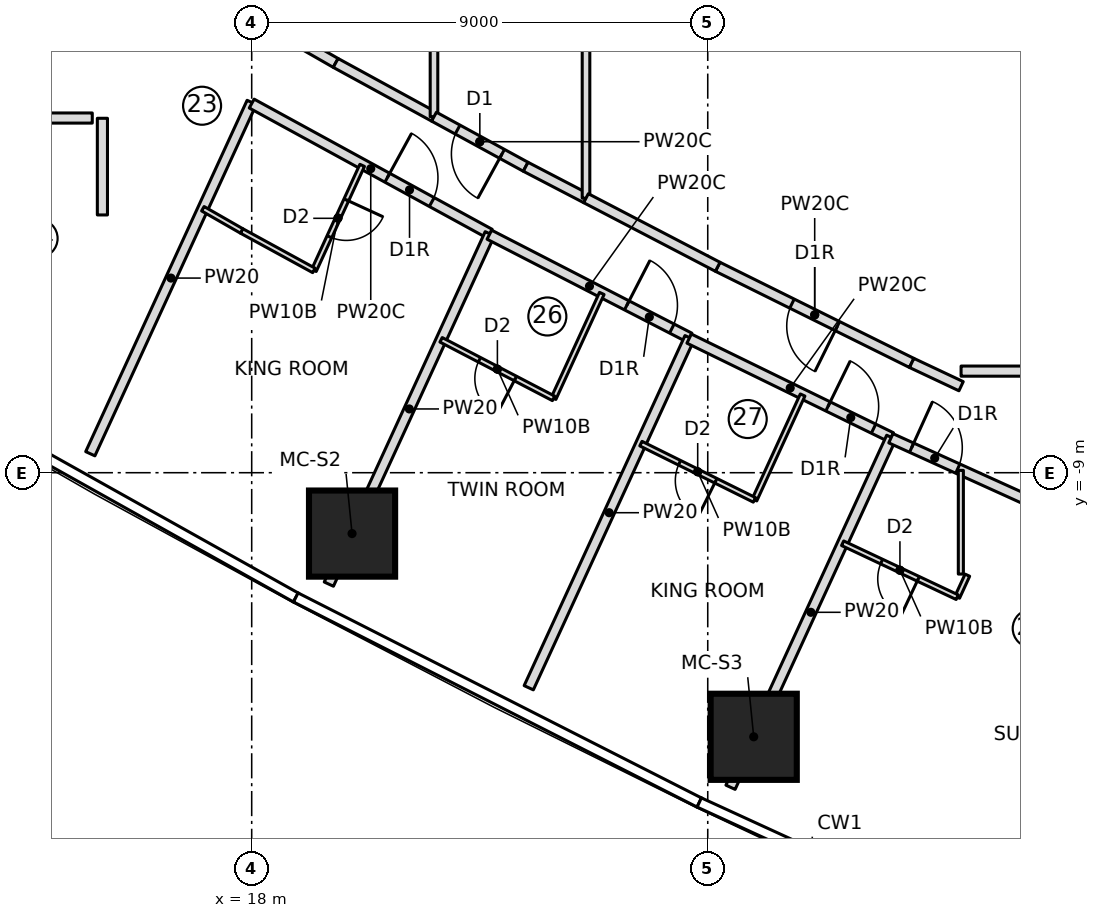
"""IFC4 building model, lengths in metres.
Left out: names, types, materials, properties, quantities, classifications, styles, units other than length and angle.
Written with IfcOpenShell. Run it as: python <this file> out.ifc"""

import sys

from ifc_helpers import new_model, si_unit, direction, frame, frame_2d, origin, origin_2d, place, context, subcontext, project, spatial, rectangle, extrude, element, fill, save


model = new_model("IFC4")
c1 = context("Model", 3, precision=1e-05, world=origin(), true_north=direction((0.0, 1.0)))
c2 = subcontext(c1, "Body", "Model", "MODEL_VIEW")
j1 = project(units=[si_unit("LENGTHUNIT", "METRE"), si_unit("PLANEANGLEUNIT", "RADIAN")], contexts=[c1])
p1 = place(None, origin())
s1 = spatial("IfcSite", under=j1, at=p1, CompositionType="ELEMENT")
p2 = place(p1, origin())
s2 = spatial("IfcBuilding", under=s1, at=p2, CompositionType="ELEMENT")
p3 = place(p2, frame((0.0, 0.0, 99.1)))
s3 = spatial("IfcBuildingStorey", under=s2, at=p3, CompositionType="ELEMENT", Elevation=99.1)
for number, where, z_axis, x_axis in (
    (1, (19.981, -10.202, 0.0), (0.0, 0.0, 1.0), (1.0, 0.0, 0.0)),
    (2, (27.907, -14.212, 0.0), (0.0, 0.0, 1.0), (1.0, 0.0, 0.0)),
):
    element("IfcColumn", number, at=place(p3, frame(where, z_axis=z_axis, x_axis=x_axis)), inside=s3, PredefinedType="COLUMN", context=c2, shape_type="SweptSolid", body=[
        extrude(rectangle(XDim=1.7, YDim=1.7, at=origin_2d()), origin(), (0.0, 0.0, 1.0), 3.55),
    ])
p4 = place(p3, frame((11.685, -2.0, 0.0), z_axis=(0.0, 0.0, 1.0), x_axis=(1.0, 0.0, 0.0)))
e3 = element("IfcWall", 3, at=p4, inside=s3, PredefinedType="PARTITIONING", context=c2, shape_type="SweptSolid", body=[
    extrude(rectangle(XDim=3.168, YDim=0.2, at=frame_2d((1.584, 0.0))), origin(), (0.0, 0.0, 1.0), 3.25),
])
p5 = place(p4, frame((1.084, 0.0, 0.0)))
e4 = element("IfcOpeningElement", 4, at=p5, cuts=e3, PredefinedType="OPENING", context=c2, shape_type="SweptSolid", body=[
    extrude(rectangle(XDim=1.0, YDim=2.1, at=frame_2d((0.5, 1.05))), frame((0.0, 0.11, 0.0), z_axis=(0.0, -1.0, 0.0), x_axis=(1.0, 0.0, 0.0)), (0.0, 0.0, 1.0), 0.22),
])
p6 = place(p3, frame((14.815, -8.626, 0.0), z_axis=(0.0, 0.0, 1.0), x_axis=(0.417432341259, 0.908708006166, 0.0)))
e5 = element("IfcWall", 5, at=p6, inside=s3, PredefinedType="PARTITIONING", context=c2, shape_type="SweptSolid", body=[
    extrude(rectangle(XDim=7.631, YDim=0.2, at=frame_2d((3.815, 0.0))), origin(), (0.0, 0.0, 1.0), 3.25),
])
p7 = place(p3, frame((18.0, -1.715, 0.0), z_axis=(0.0, 0.0, 1.0), x_axis=(0.877354946945, -0.479841950096, 0.0)))
e6 = element("IfcWall", 6, at=p7, inside=s3, PredefinedType="PARTITIONING", context=c2, shape_type="SweptSolid", body=[
    extrude(rectangle(XDim=5.355, YDim=0.2, at=frame_2d((2.678, 0.0))), origin(), (0.0, 0.0, 1.0), 3.25),
])
p8 = place(p7, frame((3.05, 0.0, 0.0)))
e7 = element("IfcOpeningElement", 7, at=p8, cuts=e6, PredefinedType="OPENING", context=c2, shape_type="SweptSolid", body=[
    extrude(rectangle(XDim=1.0, YDim=2.1, at=frame_2d((0.5, 1.05))), frame((0.0, 0.11, 0.0), z_axis=(0.0, -1.0, 0.0), x_axis=(1.0, 0.0, 0.0)), (0.0, 0.0, 1.0), 0.22),
])
p9 = place(p3, frame((20.18, -2.934, 0.0), z_axis=(0.0, 0.0, 1.0), x_axis=(-0.417450047292, -0.908699872354, 0.0)))
e8 = element("IfcWall", 8, at=p9, inside=s3, PredefinedType="PARTITIONING", context=c2, shape_type="SweptSolid", body=[
    extrude(rectangle(XDim=2.283, YDim=0.1, at=frame_2d((1.141, 0.0))), origin(), (0.0, 0.0, 1.0), 3.25),
])
p10 = place(p9, frame((0.75, 0.0, 0.0)))
e9 = element("IfcOpeningElement", 9, at=p10, cuts=e8, PredefinedType="OPENING", context=c2, shape_type="SweptSolid", body=[
    extrude(rectangle(XDim=0.8, YDim=2.1, at=frame_2d((0.4, 1.05))), frame((0.0, 0.06, 0.0), z_axis=(0.0, -1.0, 0.0), x_axis=(1.0, 0.0, 0.0)), (0.0, 0.0, 1.0), 0.12),
])
p11 = place(p3, frame((19.228, -5.008, 0.0), z_axis=(0.0, 0.0, 1.0), x_axis=(-0.877424481957, 0.479714788663, 0.0)))
e10 = element("IfcWall", 10, at=p11, inside=s3, PredefinedType="PARTITIONING", context=c2, shape_type="SweptSolid", body=[
    extrude(rectangle(XDim=1.625, YDim=0.1, at=frame_2d((0.813, 0.0))), origin(), (0.0, 0.0, 1.0), 3.25),
])
p12 = place(p3, frame((17.801, -4.229, 0.0), z_axis=(0.0, 0.0, 1.0), x_axis=(-0.867629162742, 0.497211862248, 0.0)))
e11 = element("IfcWall", 11, at=p12, inside=s3, PredefinedType="PARTITIONING", context=c2, shape_type="SweptSolid", body=[
    extrude(rectangle(XDim=0.882, YDim=0.1, at=frame_2d((0.441, 0.0))), origin(), (0.0, 0.0, 1.0), 3.25),
])
p13 = place(p3, frame((19.522, -11.199, 0.0), z_axis=(0.0, 0.0, 1.0), x_axis=(0.417413534969, 0.908716644959, 0.0)))
e12 = element("IfcWall", 12, at=p13, inside=s3, PredefinedType="PARTITIONING", context=c2, shape_type="SweptSolid", body=[
    extrude(rectangle(XDim=7.609, YDim=0.2, at=frame_2d((3.805, 0.0))), origin(), (0.0, 0.0, 1.0), 3.25),
])
p14 = place(p3, frame((22.69, -4.302, 0.0), z_axis=(0.0, 0.0, 1.0), x_axis=(0.889236075961, -0.457448577667, 0.0)))
e13 = element("IfcWall", 13, at=p14, inside=s3, PredefinedType="PARTITIONING", context=c2, shape_type="SweptSolid", body=[
    extrude(rectangle(XDim=4.443, YDim=0.2, at=frame_2d((2.222, 0.0))), origin(), (0.0, 0.0, 1.0), 3.25),
])
p15 = place(p14, frame((3.05, 0.0, 0.0)))
e14 = element("IfcOpeningElement", 14, at=p15, cuts=e13, PredefinedType="OPENING", context=c2, shape_type="SweptSolid", body=[
    extrude(rectangle(XDim=1.0, YDim=2.1, at=frame_2d((0.5, 1.05))), frame((0.0, 0.11, 0.0), z_axis=(0.0, -1.0, 0.0), x_axis=(1.0, 0.0, 0.0)), (0.0, 0.0, 1.0), 0.22),
])
p16 = place(p3, frame((24.909, -5.462, 0.0), z_axis=(0.0, 0.0, 1.0), x_axis=(-0.417454762401, -0.908697706253, 0.0)))
e15 = element("IfcWall", 15, at=p16, inside=s3, PredefinedType="PARTITIONING", context=c2, shape_type="SweptSolid", body=[
    extrude(rectangle(XDim=2.28, YDim=0.1, at=frame_2d((1.14, 0.0))), origin(), (0.0, 0.0, 1.0), 3.25),
])
p17 = place(p3, frame((23.958, -7.533, 0.0), z_axis=(0.0, 0.0, 1.0), x_axis=(-0.886911586599, 0.461939214135, 0.0)))
e16 = element("IfcWall", 16, at=p17, inside=s3, PredefinedType="PARTITIONING", context=c2, shape_type="SweptSolid", body=[
    extrude(rectangle(XDim=2.503, YDim=0.1, at=frame_2d((1.251, 0.0))), origin(), (0.0, 0.0, 1.0), 3.25),
])
p18 = place(p17, frame((0.85, 0.0, 0.0)))
e17 = element("IfcOpeningElement", 17, at=p18, cuts=e16, PredefinedType="OPENING", context=c2, shape_type="SweptSolid", body=[
    extrude(rectangle(XDim=0.8, YDim=2.1, at=frame_2d((0.4, 1.05))), frame((0.0, 0.06, 0.0), z_axis=(0.0, -1.0, 0.0), x_axis=(1.0, 0.0, 0.0)), (0.0, 0.0, 1.0), 0.12),
])
p19 = place(p3, frame((23.467, -13.244, 0.0), z_axis=(0.0, 0.0, 1.0), x_axis=(0.417455028008, 0.908697584233, 0.0)))
e18 = element("IfcWall", 18, at=p19, inside=s3, PredefinedType="PARTITIONING", context=c2, shape_type="SweptSolid", body=[
    extrude(rectangle(XDim=7.603, YDim=0.2, at=frame_2d((3.802, 0.0))), origin(), (0.0, 0.0, 1.0), 3.25),
])
p20 = place(p3, frame((26.633, -6.353, 0.0), z_axis=(0.0, 0.0, 1.0), x_axis=(0.898502457097, -0.438968489291, 0.0)))
e19 = element("IfcWall", 19, at=p20, inside=s3, PredefinedType="PARTITIONING", context=c2, shape_type="SweptSolid", body=[
    extrude(rectangle(XDim=4.44, YDim=0.2, at=frame_2d((2.22, 0.0))), origin(), (0.0, 0.0, 1.0), 3.25),
])
p21 = place(p20, frame((3.05, 0.0, 0.0)))
e20 = element("IfcOpeningElement", 20, at=p21, cuts=e19, PredefinedType="OPENING", context=c2, shape_type="SweptSolid", body=[
    extrude(rectangle(XDim=1.0, YDim=2.1, at=frame_2d((0.5, 1.05))), frame((0.0, 0.11, 0.0), z_axis=(0.0, -1.0, 0.0), x_axis=(1.0, 0.0, 0.0)), (0.0, 0.0, 1.0), 0.22),
])
p22 = place(p3, frame((28.873, -7.467, 0.0), z_axis=(0.0, 0.0, 1.0), x_axis=(-0.417433204355, -0.908707609686, 0.0)))
e21 = element("IfcWall", 21, at=p22, inside=s3, PredefinedType="PARTITIONING", context=c2, shape_type="SweptSolid", body=[
    extrude(rectangle(XDim=2.278, YDim=0.1, at=frame_2d((1.139, 0.0))), origin(), (0.0, 0.0, 1.0), 3.25),
])
p23 = place(p3, frame((27.922, -9.537, 0.0), z_axis=(0.0, 0.0, 1.0), x_axis=(-0.895944857815, 0.444165297784, 0.0)))
e22 = element("IfcWall", 22, at=p23, inside=s3, PredefinedType="PARTITIONING", context=c2, shape_type="SweptSolid", body=[
    extrude(rectangle(XDim=2.501, YDim=0.1, at=frame_2d((1.25, 0.0))), origin(), (0.0, 0.0, 1.0), 3.25),
])
p24 = place(p23, frame((0.85, 0.0, 0.0)))
e23 = element("IfcOpeningElement", 23, at=p24, cuts=e22, PredefinedType="OPENING", context=c2, shape_type="SweptSolid", body=[
    extrude(rectangle(XDim=0.8, YDim=2.1, at=frame_2d((0.4, 1.05))), frame((0.0, 0.06, 0.0), z_axis=(0.0, -1.0, 0.0), x_axis=(1.0, 0.0, 0.0)), (0.0, 0.0, 1.0), 0.12),
])
p25 = place(p3, frame((27.449, -15.208, 0.0), z_axis=(0.0, 0.0, 1.0), x_axis=(0.417429919618, 0.90870911859, 0.0)))
e24 = element("IfcWall", 24, at=p25, inside=s3, PredefinedType="PARTITIONING", context=c2, shape_type="SweptSolid", body=[
    extrude(rectangle(XDim=7.6, YDim=0.2, at=frame_2d((3.8, 0.0))), origin(), (0.0, 0.0, 1.0), 3.25),
])
p26 = place(p3, frame((30.614, -8.32, 0.0), z_axis=(0.0, 0.0, 1.0), x_axis=(0.910751030363, -0.41295588226, 0.0)))
e25 = element("IfcWall", 25, at=p26, inside=s3, PredefinedType="PARTITIONING", context=c2, shape_type="SweptSolid", body=[
    extrude(rectangle(XDim=8.883, YDim=0.2, at=frame_2d((4.442, 0.0))), origin(), (0.0, 0.0, 1.0), 3.25),
])
p27 = place(p26, frame((0.45, 0.0, 0.0)))
e26 = element("IfcOpeningElement", 26, at=p27, cuts=e25, PredefinedType="OPENING", context=c2, shape_type="SweptSolid", body=[
    extrude(rectangle(XDim=1.0, YDim=2.1, at=frame_2d((0.5, 1.05))), frame((0.0, 0.11, 0.0), z_axis=(0.0, -1.0, 0.0), x_axis=(1.0, 0.0, 0.0)), (0.0, 0.0, 1.0), 0.22),
])
p28 = place(p3, frame((32.124, -11.022, 0.0), z_axis=(0.0, 0.0, 1.0), x_axis=(-0.4176025781, -0.908629785316, 0.0)))
e27 = element("IfcWall", 27, at=p28, inside=s3, PredefinedType="PARTITIONING", context=c2, shape_type="SweptSolid", body=[
    extrude(rectangle(XDim=0.479, YDim=0.1, at=frame_2d((0.239, 0.0))), origin(), (0.0, 0.0, 1.0), 3.25),
])
p29 = place(p3, frame((31.924, -11.457, 0.0), z_axis=(0.0, 0.0, 1.0), x_axis=(-0.904688082375, 0.426074493027, 0.0)))
e28 = element("IfcWall", 28, at=p29, inside=s3, PredefinedType="PARTITIONING", context=c2, shape_type="SweptSolid", body=[
    extrude(rectangle(XDim=2.5, YDim=0.1, at=frame_2d((1.25, 0.0))), origin(), (0.0, 0.0, 1.0), 3.25),
])
p30 = place(p29, frame((0.85, 0.0, 0.0)))
e29 = element("IfcOpeningElement", 29, at=p30, cuts=e28, PredefinedType="OPENING", context=c2, shape_type="SweptSolid", body=[
    extrude(rectangle(XDim=0.8, YDim=2.1, at=frame_2d((0.4, 1.05))), frame((0.0, 0.06, 0.0), z_axis=(0.0, -1.0, 0.0), x_axis=(1.0, 0.0, 0.0)), (0.0, 0.0, 1.0), 0.12),
])
p31 = place(p3, frame((19.657, -0.912, 0.0), z_axis=(0.0, 0.0, 1.0), x_axis=(-0.867694156962, 0.49709843087, 0.0)))
e30 = element("IfcWall", 30, at=p31, inside=s3, PredefinedType="PARTITIONING", context=c2, shape_type="SweptSolid", body=[
    extrude(rectangle(XDim=1.835, YDim=0.2, at=frame_2d((0.918, 0.0))), origin(), (0.0, 0.0, 1.0), 3.25),
])
p32 = place(p3, frame((21.598, -1.973, 0.0), z_axis=(0.0, 0.0, 1.0), x_axis=(-0.877490210137, 0.479594548671, 0.0)))
e31 = element("IfcWall", 31, at=p32, inside=s3, PredefinedType="PARTITIONING", context=c2, shape_type="SweptSolid", body=[
    extrude(rectangle(XDim=2.211, YDim=0.2, at=frame_2d((1.106, 0.0))), origin(), (0.0, 0.0, 1.0), 3.25),
])
p33 = place(p3, frame((21.598, -1.973, 0.0), z_axis=(0.0, 0.0, 1.0), x_axis=(0.0, 1.0, 0.0)))
e32 = element("IfcWall", 32, at=p33, inside=s3, PredefinedType="PARTITIONING", context=c2, shape_type="SweptSolid", body=[
    extrude(rectangle(XDim=3.946, YDim=0.15, at=frame_2d((1.973, 0.0))), origin(), (0.0, 0.0, 1.0), 3.25),
])
p34 = place(p3, frame((23.407, -2.962, 0.0), z_axis=(0.0, 0.0, 1.0), x_axis=(-0.877438115071, 0.479689852113, 0.0)))
e33 = element("IfcWall", 33, at=p34, inside=s3, PredefinedType="PARTITIONING", context=c2, shape_type="SweptSolid", body=[
    extrude(rectangle(XDim=2.062, YDim=0.2, at=frame_2d((1.031, 0.0))), origin(), (0.0, 0.0, 1.0), 3.25),
])
p35 = place(p34, frame((0.531, 0.0, 0.0)))
e34 = element("IfcOpeningElement", 34, at=p35, cuts=e33, PredefinedType="OPENING", context=c2, shape_type="SweptSolid", body=[
    extrude(rectangle(XDim=1.0, YDim=2.1, at=frame_2d((0.5, 1.05))), frame((0.0, 0.11, 0.0), z_axis=(0.0, -1.0, 0.0), x_axis=(1.0, 0.0, 0.0)), (0.0, 0.0, 1.0), 0.22),
])
p36 = place(p3, frame((24.598, -3.582, 0.0), z_axis=(0.0, 0.0, 1.0), x_axis=(-0.88688614944, 0.461988049555, 0.0)))
e35 = element("IfcWall", 35, at=p36, inside=s3, PredefinedType="PARTITIONING", context=c2, shape_type="SweptSolid", body=[
    extrude(rectangle(XDim=1.343, YDim=0.2, at=frame_2d((0.671, 0.0))), origin(), (0.0, 0.0, 1.0), 3.25),
])
p37 = place(p3, frame((24.598, -3.582, 0.0), z_axis=(0.0, 0.0, 1.0), x_axis=(0.0, 1.0, 0.0)))
e36 = element("IfcWall", 36, at=p37, inside=s3, PredefinedType="PARTITIONING", context=c2, shape_type="SweptSolid", body=[
    extrude(rectangle(XDim=7.165, YDim=0.15, at=frame_2d((3.582, 0.0))), origin(), (0.0, 0.0, 1.0), 3.25),
])
p38 = place(p3, frame((31.025, -6.833, 0.0), z_axis=(0.0, 0.0, 1.0), x_axis=(-0.895975836328, 0.44410280422, 0.0)))
e37 = element("IfcWall", 37, at=p38, inside=s3, PredefinedType="PARTITIONING", context=c2, shape_type="SweptSolid", body=[
    extrude(rectangle(XDim=4.273, YDim=0.2, at=frame_2d((2.137, 0.0))), origin(), (0.0, 0.0, 1.0), 3.25),
])
p39 = place(p38, frame((1.636, 0.0, 0.0)))
e38 = element("IfcOpeningElement", 38, at=p39, cuts=e37, PredefinedType="OPENING", context=c2, shape_type="SweptSolid", body=[
    extrude(rectangle(XDim=1.0, YDim=2.1, at=frame_2d((0.5, 1.05))), frame((0.0, 0.11, 0.0), z_axis=(0.0, -1.0, 0.0), x_axis=(1.0, 0.0, 0.0)), (0.0, 0.0, 1.0), 0.22),
])
p40 = place(p3, frame((32.0, -7.293, 0.0), z_axis=(0.0, 0.0, 1.0), x_axis=(-0.904690325494, 0.426069730159, 0.0)))
e39 = element("IfcWall", 39, at=p40, inside=s3, PredefinedType="PARTITIONING", context=c2, shape_type="SweptSolid", body=[
    extrude(rectangle(XDim=1.078, YDim=0.2, at=frame_2d((0.539, 0.0))), origin(), (0.0, 0.0, 1.0), 3.25),
])
p41 = place(p3, frame((27.196, -4.936, 0.0), z_axis=(0.0, 0.0, 1.0), x_axis=(-0.886905549588, 0.461950804859, 0.0)))
e40 = element("IfcWall", 40, at=p41, inside=s3, PredefinedType="PARTITIONING", context=c2, shape_type="SweptSolid", body=[
    extrude(rectangle(XDim=2.93, YDim=0.2, at=frame_2d((1.465, 0.0))), origin(), (0.0, 0.0, 1.0), 3.25),
])
p42 = place(p3, frame((31.995, -8.954, 0.0), z_axis=(0.0, 0.0, 1.0), x_axis=(0.0, -1.0, 0.0)))
e41 = element("IfcWall", 41, at=p42, inside=s3, PredefinedType="PARTITIONING", context=c2, shape_type="SweptSolid", body=[
    extrude(rectangle(XDim=2.046, YDim=0.1, at=frame_2d((1.023, 0.0))), origin(), (0.0, 0.0, 1.0), 3.25),
])
p43 = place(p3, frame((35.962, -6.996, 0.0), z_axis=(0.0, 0.0, 1.0), x_axis=(-0.999999992409, 0.000123213405, 0.0)))
e42 = element("IfcWall", 42, at=p43, inside=s3, PredefinedType="PARTITIONING", context=c2, shape_type="SweptSolid", body=[
    extrude(rectangle(XDim=3.963, YDim=0.2, at=frame_2d((1.981, 0.0))), origin(), (0.0, 0.0, 1.0), 3.25),
])
p44 = place(p3, frame((15.054, -2.005, 0.0), z_axis=(0.0, 0.0, 1.0), x_axis=(0.0, -1.0, 0.0)))
e43 = element("IfcWall", 43, at=p44, inside=s3, PredefinedType="PARTITIONING", context=c2, shape_type="SweptSolid", body=[
    extrude(rectangle(XDim=1.908, YDim=0.2, at=frame_2d((0.954, 0.0))), origin(), (0.0, 0.0, 1.0), 3.25),
])
p45 = place(p10, origin())
e44 = element("IfcDoor", 44, at=p45, inside=s3, OperationType="SINGLE_SWING_LEFT", PredefinedType="DOOR", context=c2, shape_type="SweptSolid", body=[
    extrude(rectangle(XDim=0.8, YDim=2.1, at=frame_2d((0.4, 1.05))), frame((0.0, 0.025, 0.0), z_axis=(0.0, -1.0, 0.0), x_axis=(1.0, 0.0, 0.0)), (0.0, 0.0, 1.0), 0.05),
])
fill(e9, e44)
p46 = place(p8, origin())
e45 = element("IfcDoor", 45, at=p46, inside=s3, OperationType="SINGLE_SWING_RIGHT", PredefinedType="DOOR", context=c2, shape_type="SweptSolid", body=[
    extrude(rectangle(XDim=1.0, YDim=2.1, at=frame_2d((0.5, 1.05))), frame((0.0, 0.025, 0.0), z_axis=(0.0, -1.0, 0.0), x_axis=(1.0, 0.0, 0.0)), (0.0, 0.0, 1.0), 0.05),
])
fill(e7, e45)
p47 = place(p18, origin())
e46 = element("IfcDoor", 46, at=p47, inside=s3, OperationType="SINGLE_SWING_LEFT", PredefinedType="DOOR", context=c2, shape_type="SweptSolid", body=[
    extrude(rectangle(XDim=0.8, YDim=2.1, at=frame_2d((0.4, 1.05))), frame((0.0, 0.025, 0.0), z_axis=(0.0, -1.0, 0.0), x_axis=(1.0, 0.0, 0.0)), (0.0, 0.0, 1.0), 0.05),
])
fill(e17, e46)
p48 = place(p15, origin())
e47 = element("IfcDoor", 47, at=p48, inside=s3, OperationType="SINGLE_SWING_RIGHT", PredefinedType="DOOR", context=c2, shape_type="SweptSolid", body=[
    extrude(rectangle(XDim=1.0, YDim=2.1, at=frame_2d((0.5, 1.05))), frame((0.0, 0.025, 0.0), z_axis=(0.0, -1.0, 0.0), x_axis=(1.0, 0.0, 0.0)), (0.0, 0.0, 1.0), 0.05),
])
fill(e14, e47)
p49 = place(p24, origin())
e48 = element("IfcDoor", 48, at=p49, inside=s3, OperationType="SINGLE_SWING_LEFT", PredefinedType="DOOR", context=c2, shape_type="SweptSolid", body=[
    extrude(rectangle(XDim=0.8, YDim=2.1, at=frame_2d((0.4, 1.05))), frame((0.0, 0.025, 0.0), z_axis=(0.0, -1.0, 0.0), x_axis=(1.0, 0.0, 0.0)), (0.0, 0.0, 1.0), 0.05),
])
fill(e23, e48)
p50 = place(p21, origin())
e49 = element("IfcDoor", 49, at=p50, inside=s3, OperationType="SINGLE_SWING_RIGHT", PredefinedType="DOOR", context=c2, shape_type="SweptSolid", body=[
    extrude(rectangle(XDim=1.0, YDim=2.1, at=frame_2d((0.5, 1.05))), frame((0.0, 0.025, 0.0), z_axis=(0.0, -1.0, 0.0), x_axis=(1.0, 0.0, 0.0)), (0.0, 0.0, 1.0), 0.05),
])
fill(e20, e49)
p51 = place(p30, origin())
e50 = element("IfcDoor", 50, at=p51, inside=s3, OperationType="SINGLE_SWING_LEFT", PredefinedType="DOOR", context=c2, shape_type="SweptSolid", body=[
    extrude(rectangle(XDim=0.8, YDim=2.1, at=frame_2d((0.4, 1.05))), frame((0.0, 0.025, 0.0), z_axis=(0.0, -1.0, 0.0), x_axis=(1.0, 0.0, 0.0)), (0.0, 0.0, 1.0), 0.05),
])
fill(e29, e50)
p52 = place(p27, origin())
e51 = element("IfcDoor", 51, at=p52, inside=s3, OperationType="SINGLE_SWING_RIGHT", PredefinedType="DOOR", context=c2, shape_type="SweptSolid", body=[
    extrude(rectangle(XDim=1.0, YDim=2.1, at=frame_2d((0.5, 1.05))), frame((0.0, 0.025, 0.0), z_axis=(0.0, -1.0, 0.0), x_axis=(1.0, 0.0, 0.0)), (0.0, 0.0, 1.0), 0.05),
])
fill(e26, e51)
p53 = place(p35, origin())
e52 = element("IfcDoor", 52, at=p53, inside=s3, OperationType="SINGLE_SWING_LEFT", PredefinedType="DOOR", context=c2, shape_type="SweptSolid", body=[
    extrude(rectangle(XDim=1.0, YDim=2.1, at=frame_2d((0.5, 1.05))), frame((0.0, 0.025, 0.0), z_axis=(0.0, -1.0, 0.0), x_axis=(1.0, 0.0, 0.0)), (0.0, 0.0, 1.0), 0.05),
])
fill(e34, e52)
p54 = place(p39, origin())
e53 = element("IfcDoor", 53, at=p54, inside=s3, OperationType="SINGLE_SWING_RIGHT", PredefinedType="DOOR", context=c2, shape_type="SweptSolid", body=[
    extrude(rectangle(XDim=1.0, YDim=2.1, at=frame_2d((0.5, 1.05))), frame((0.0, 0.025, 0.0), z_axis=(0.0, -1.0, 0.0), x_axis=(1.0, 0.0, 0.0)), (0.0, 0.0, 1.0), 0.05),
])
fill(e38, e53)
save(model, sys.argv[1])
